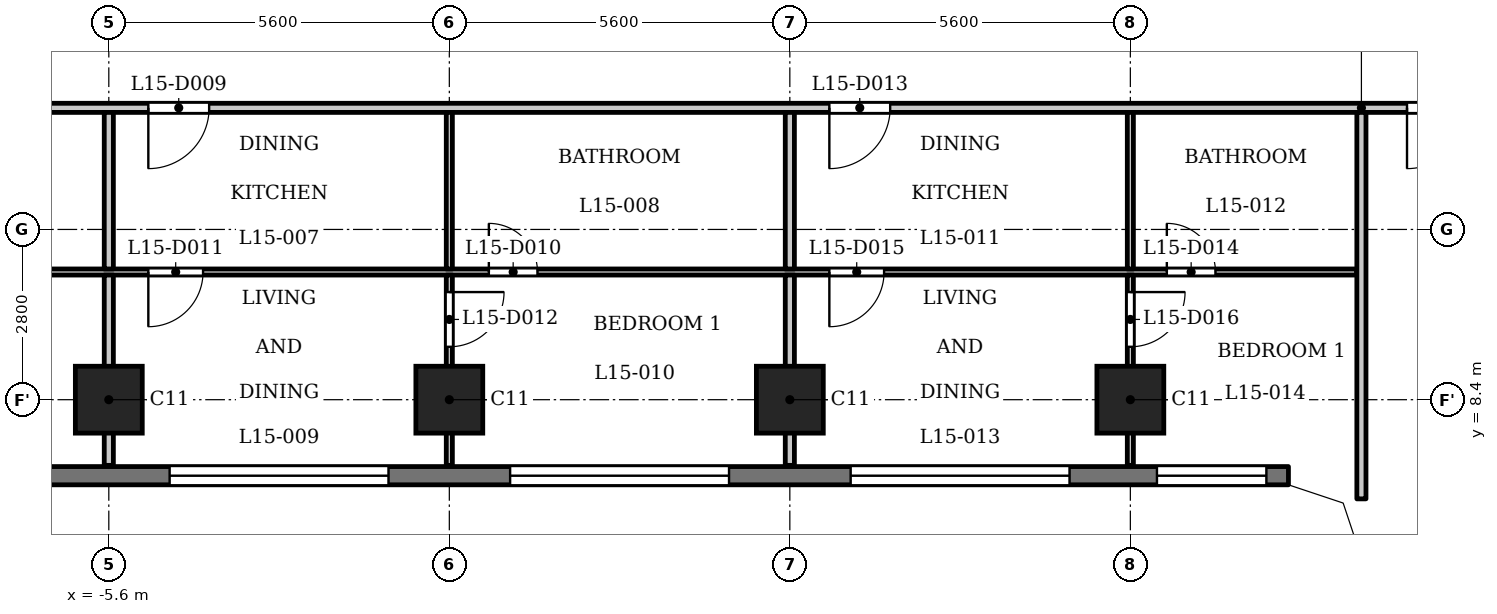
"""IFC4 building model, lengths in metres.
Left out: names, types, materials, properties, quantities, classifications, styles, units other than length and angle.
Written with IfcOpenShell. Run it as: python <this file> out.ifc"""

import sys

from ifc_helpers import new_model, si_unit, direction, frame, frame_2d, origin, origin_2d, place, context, subcontext, project, spatial, polyline, rectangle, outline, extrude, element, fill, save


model = new_model("IFC4")
c1 = context("Model", 3, precision=1e-05, world=origin(), true_north=direction((0.0, 1.0)))
c2 = subcontext(c1, "Body", "Model", "MODEL_VIEW")
j1 = project(units=[si_unit("LENGTHUNIT", "METRE"), si_unit("PLANEANGLEUNIT", "RADIAN")], contexts=[c1])
p1 = place(None, origin())
s1 = spatial("IfcSite", under=j1, at=p1, CompositionType="ELEMENT")
p2 = place(p1, origin())
s2 = spatial("IfcBuilding", under=s1, at=p2, CompositionType="ELEMENT")
p3 = place(p2, frame((0.0, 0.0, 62.0)))
s3 = spatial("IfcBuildingStorey", under=s2, at=p3, CompositionType="ELEMENT", Elevation=62.0)
for number, where, z_axis, x_axis in (
    (1, (-5.6, 8.4, 0.0), (0.0, 0.0, 1.0), (1.0, 0.0, 0.0)),
    (2, (0.0, 8.4, 0.0), (0.0, 0.0, 1.0), (1.0, 0.0, 0.0)),
    (3, (5.6, 8.4, 0.0), (0.0, 0.0, 1.0), (1.0, 0.0, 0.0)),
    (4, (11.2, 8.4, 0.0), (0.0, 0.0, 1.0), (1.0, 0.0, 0.0)),
):
    element("IfcColumn", number, at=place(p3, frame(where, z_axis=z_axis, x_axis=x_axis)), inside=s3, PredefinedType="COLUMN", context=c2, shape_type="SweptSolid", body=[
        extrude(rectangle(XDim=1.1, YDim=1.1, at=origin_2d()), origin(), (0.0, 0.0, 1.0), 3.5),
    ])
p4 = place(p3, frame((-13.8, 7.15, 0.0), z_axis=(0.0, 0.0, 1.0), x_axis=(1.0, 0.0, 0.0)))
e5 = element("IfcWall", 5, at=p4, inside=s3, PredefinedType="SOLIDWALL", context=c2, shape_type="SweptSolid", body=[
    extrude(rectangle(XDim=27.6, YDim=0.3, at=frame_2d((13.8, 0.0))), origin(), (0.0, 0.0, 1.0), 3.2),
])
p5 = place(p4, frame((0.363, 0.0, 0.9)))
e6 = element("IfcOpeningElement", 6, at=p5, cuts=e5, PredefinedType="OPENING", context=c2, shape_type="SweptSolid", body=[
    extrude(rectangle(XDim=1.8, YDim=1.25, at=frame_2d((0.9, 0.625))), frame((0.0, 0.16, 0.0), z_axis=(0.0, -1.0, 0.0), x_axis=(1.0, 0.0, 0.0)), (0.0, 0.0, 1.0), 0.32),
])
p6 = place(p4, frame((3.6, 0.0, 1.2)))
e7 = element("IfcOpeningElement", 7, at=p6, cuts=e5, PredefinedType="OPENING", context=c2, shape_type="SweptSolid", body=[
    extrude(rectangle(XDim=3.6, YDim=0.95, at=frame_2d((1.8, 0.475))), frame((0.0, 0.16, 0.0), z_axis=(0.0, -1.0, 0.0), x_axis=(1.0, 0.0, 0.0)), (0.0, 0.0, 1.0), 0.32),
])
p7 = place(p4, frame((9.2, 0.0, 1.2)))
e8 = element("IfcOpeningElement", 8, at=p7, cuts=e5, PredefinedType="OPENING", context=c2, shape_type="SweptSolid", body=[
    extrude(rectangle(XDim=3.6, YDim=0.95, at=frame_2d((1.8, 0.475))), frame((0.0, 0.16, 0.0), z_axis=(0.0, -1.0, 0.0), x_axis=(1.0, 0.0, 0.0)), (0.0, 0.0, 1.0), 0.32),
])
p8 = place(p4, frame((14.8, 0.0, 1.2)))
e9 = element("IfcOpeningElement", 9, at=p8, cuts=e5, PredefinedType="OPENING", context=c2, shape_type="SweptSolid", body=[
    extrude(rectangle(XDim=3.6, YDim=0.95, at=frame_2d((1.8, 0.475))), frame((0.0, 0.16, 0.0), z_axis=(0.0, -1.0, 0.0), x_axis=(1.0, 0.0, 0.0)), (0.0, 0.0, 1.0), 0.32),
])
p9 = place(p4, frame((20.4, 0.0, 1.2)))
e10 = element("IfcOpeningElement", 10, at=p9, cuts=e5, PredefinedType="OPENING", context=c2, shape_type="SweptSolid", body=[
    extrude(rectangle(XDim=3.6, YDim=0.95, at=frame_2d((1.8, 0.475))), frame((0.0, 0.16, 0.0), z_axis=(0.0, -1.0, 0.0), x_axis=(1.0, 0.0, 0.0)), (0.0, 0.0, 1.0), 0.32),
])
p10 = place(p4, frame((25.438, 0.0, 0.9)))
e11 = element("IfcOpeningElement", 11, at=p10, cuts=e5, PredefinedType="OPENING", context=c2, shape_type="SweptSolid", body=[
    extrude(rectangle(XDim=1.8, YDim=1.25, at=frame_2d((0.9, 0.625))), frame((0.0, 0.16, 0.0), z_axis=(0.0, -1.0, 0.0), x_axis=(1.0, 0.0, 0.0)), (0.0, 0.0, 1.0), 0.32),
])
p11 = place(p3, frame((-14.925, 10.5, 0.0), z_axis=(0.0, 0.0, 1.0), x_axis=(1.0, 0.0, 0.0)))
e12 = element("IfcWall", 12, at=p11, inside=s3, PredefinedType="PARTITIONING", context=c2, shape_type="SweptSolid", body=[
    extrude(rectangle(XDim=29.85, YDim=0.1, at=frame_2d((14.925, 0.0))), origin(), (0.0, 0.0, 1.0), 3.2),
])
p12 = place(p11, frame((0.525, 0.0, 0.0)))
e13 = element("IfcOpeningElement", 13, at=p12, cuts=e12, PredefinedType="OPENING", context=c2, shape_type="SweptSolid", body=[
    extrude(rectangle(XDim=0.8, YDim=2.1, at=frame_2d((0.4, 1.05))), frame((0.0, 0.06, 0.0), z_axis=(0.0, -1.0, 0.0), x_axis=(1.0, 0.0, 0.0)), (0.0, 0.0, 1.0), 0.12),
])
p13 = place(p11, frame((4.375, 0.0, 0.0)))
e14 = element("IfcOpeningElement", 14, at=p13, cuts=e12, PredefinedType="OPENING", context=c2, shape_type="SweptSolid", body=[
    extrude(rectangle(XDim=0.9, YDim=2.1, at=frame_2d((0.45, 1.05))), frame((0.0, 0.06, 0.0), z_axis=(0.0, -1.0, 0.0), x_axis=(1.0, 0.0, 0.0)), (0.0, 0.0, 1.0), 0.12),
])
p14 = place(p11, frame((15.575, 0.0, 0.0)))
e15 = element("IfcOpeningElement", 15, at=p14, cuts=e12, PredefinedType="OPENING", context=c2, shape_type="SweptSolid", body=[
    extrude(rectangle(XDim=0.8, YDim=2.1, at=frame_2d((0.4, 1.05))), frame((0.0, 0.06, 0.0), z_axis=(0.0, -1.0, 0.0), x_axis=(1.0, 0.0, 0.0)), (0.0, 0.0, 1.0), 0.12),
])
p15 = place(p11, frame((9.975, 0.0, 0.0)))
e16 = element("IfcOpeningElement", 16, at=p15, cuts=e12, PredefinedType="OPENING", context=c2, shape_type="SweptSolid", body=[
    extrude(rectangle(XDim=0.9, YDim=2.1, at=frame_2d((0.45, 1.05))), frame((0.0, 0.06, 0.0), z_axis=(0.0, -1.0, 0.0), x_axis=(1.0, 0.0, 0.0)), (0.0, 0.0, 1.0), 0.12),
])
p16 = place(p11, frame((26.725, 0.0, 0.0)))
e17 = element("IfcOpeningElement", 17, at=p16, cuts=e12, PredefinedType="OPENING", context=c2, shape_type="SweptSolid", body=[
    extrude(rectangle(XDim=0.8, YDim=2.1, at=frame_2d((0.4, 1.05))), frame((0.0, 0.06, 0.0), z_axis=(0.0, -1.0, 0.0), x_axis=(1.0, 0.0, 0.0)), (0.0, 0.0, 1.0), 0.12),
])
p17 = place(p11, frame((21.175, 0.0, 0.0)))
e18 = element("IfcOpeningElement", 18, at=p17, cuts=e12, PredefinedType="OPENING", context=c2, shape_type="SweptSolid", body=[
    extrude(rectangle(XDim=0.9, YDim=2.1, at=frame_2d((0.45, 1.05))), frame((0.0, 0.06, 0.0), z_axis=(0.0, -1.0, 0.0), x_axis=(1.0, 0.0, 0.0)), (0.0, 0.0, 1.0), 0.12),
])
p18 = place(p3, frame((-17.4, 13.2, 0.0), z_axis=(0.0, 0.0, 1.0), x_axis=(1.0, 0.0, 0.0)))
e19 = element("IfcWall", 19, at=p18, inside=s3, PredefinedType="PARTITIONING", context=c2, shape_type="SweptSolid", body=[
    extrude(rectangle(XDim=34.8, YDim=0.15, at=frame_2d((17.4, 0.0))), origin(), (0.0, 0.0, 1.0), 3.2),
])
p19 = place(p18, frame((0.75, 0.0, 0.0)))
e20 = element("IfcOpeningElement", 20, at=p19, cuts=e19, PredefinedType="OPENING", context=c2, shape_type="SweptSolid", body=[
    extrude(rectangle(XDim=1.0, YDim=2.1, at=frame_2d((0.5, 1.05))), frame((0.0, 0.085, 0.0), z_axis=(0.0, -1.0, 0.0), x_axis=(1.0, 0.0, 0.0)), (0.0, 0.0, 1.0), 0.17),
])
p20 = place(p18, frame((33.15, 0.0, 0.0)))
e21 = element("IfcOpeningElement", 21, at=p20, cuts=e19, PredefinedType="OPENING", context=c2, shape_type="SweptSolid", body=[
    extrude(rectangle(XDim=1.0, YDim=2.1, at=frame_2d((0.5, 1.05))), frame((0.0, 0.085, 0.0), z_axis=(0.0, -1.0, 0.0), x_axis=(1.0, 0.0, 0.0)), (0.0, 0.0, 1.0), 0.17),
])
p21 = place(p18, frame((6.85, 0.0, 0.0)))
e22 = element("IfcOpeningElement", 22, at=p21, cuts=e19, PredefinedType="OPENING", context=c2, shape_type="SweptSolid", body=[
    extrude(rectangle(XDim=1.0, YDim=2.1, at=frame_2d((0.5, 1.05))), frame((0.0, 0.085, 0.0), z_axis=(0.0, -1.0, 0.0), x_axis=(1.0, 0.0, 0.0)), (0.0, 0.0, 1.0), 0.17),
])
p22 = place(p18, frame((12.45, 0.0, 0.0)))
e23 = element("IfcOpeningElement", 23, at=p22, cuts=e19, PredefinedType="OPENING", context=c2, shape_type="SweptSolid", body=[
    extrude(rectangle(XDim=1.0, YDim=2.1, at=frame_2d((0.5, 1.05))), frame((0.0, 0.085, 0.0), z_axis=(0.0, -1.0, 0.0), x_axis=(1.0, 0.0, 0.0)), (0.0, 0.0, 1.0), 0.17),
])
p23 = place(p18, frame((23.65, 0.0, 0.0)))
e24 = element("IfcOpeningElement", 24, at=p23, cuts=e19, PredefinedType="OPENING", context=c2, shape_type="SweptSolid", body=[
    extrude(rectangle(XDim=1.0, YDim=2.1, at=frame_2d((0.5, 1.05))), frame((0.0, 0.085, 0.0), z_axis=(0.0, -1.0, 0.0), x_axis=(1.0, 0.0, 0.0)), (0.0, 0.0, 1.0), 0.17),
])
p24 = place(p3, frame((-5.6, 7.32, 0.0), z_axis=(0.0, 0.0, 1.0), x_axis=(0.0, 1.0, 0.0)))
e25 = element("IfcWall", 25, at=p24, inside=s3, PredefinedType="PARTITIONING", context=c2, shape_type="SweptSolid", body=[
    extrude(rectangle(XDim=3.13, YDim=0.15, at=frame_2d((1.565, 0.0))), origin(), (0.0, 0.0, 1.0), 3.2),
])
p25 = place(p3, frame((-5.6, 10.55, 0.0), z_axis=(0.0, 0.0, 1.0), x_axis=(0.0, 1.0, 0.0)))
e26 = element("IfcWall", 26, at=p25, inside=s3, PredefinedType="PARTITIONING", context=c2, shape_type="SweptSolid", body=[
    extrude(rectangle(XDim=2.575, YDim=0.15, at=frame_2d((1.288, 0.0))), origin(), (0.0, 0.0, 1.0), 3.2),
])
p26 = place(p3, frame((0.0, 7.32, 0.0), z_axis=(0.0, 0.0, 1.0), x_axis=(0.0, 1.0, 0.0)))
e27 = element("IfcWall", 27, at=p26, inside=s3, PredefinedType="PARTITIONING", context=c2, shape_type="SweptSolid", body=[
    extrude(rectangle(XDim=3.13, YDim=0.1, at=frame_2d((1.565, 0.0))), origin(), (0.0, 0.0, 1.0), 3.2),
])
p27 = place(p26, frame((1.95, 0.0, 0.0)))
e28 = element("IfcOpeningElement", 28, at=p27, cuts=e27, PredefinedType="OPENING", context=c2, shape_type="SweptSolid", body=[
    extrude(rectangle(XDim=0.9, YDim=2.1, at=frame_2d((0.45, 1.05))), frame((0.0, 0.06, 0.0), z_axis=(0.0, -1.0, 0.0), x_axis=(1.0, 0.0, 0.0)), (0.0, 0.0, 1.0), 0.12),
])
p28 = place(p3, frame((0.0, 10.55, 0.0), z_axis=(0.0, 0.0, 1.0), x_axis=(0.0, 1.0, 0.0)))
e29 = element("IfcWall", 29, at=p28, inside=s3, PredefinedType="PARTITIONING", context=c2, shape_type="SweptSolid", body=[
    extrude(rectangle(XDim=2.575, YDim=0.1, at=frame_2d((1.288, 0.0))), origin(), (0.0, 0.0, 1.0), 3.2),
])
p29 = place(p3, frame((5.6, 7.32, 0.0), z_axis=(0.0, 0.0, 1.0), x_axis=(0.0, 1.0, 0.0)))
e30 = element("IfcWall", 30, at=p29, inside=s3, PredefinedType="PARTITIONING", context=c2, shape_type="SweptSolid", body=[
    extrude(rectangle(XDim=3.13, YDim=0.15, at=frame_2d((1.565, 0.0))), origin(), (0.0, 0.0, 1.0), 3.2),
])
p30 = place(p3, frame((5.6, 10.55, 0.0), z_axis=(0.0, 0.0, 1.0), x_axis=(0.0, 1.0, 0.0)))
e31 = element("IfcWall", 31, at=p30, inside=s3, PredefinedType="PARTITIONING", context=c2, shape_type="SweptSolid", body=[
    extrude(rectangle(XDim=2.575, YDim=0.15, at=frame_2d((1.288, 0.0))), origin(), (0.0, 0.0, 1.0), 3.2),
])
p31 = place(p3, frame((11.2, 7.32, 0.0), z_axis=(0.0, 0.0, 1.0), x_axis=(0.0, 1.0, 0.0)))
e32 = element("IfcWall", 32, at=p31, inside=s3, PredefinedType="PARTITIONING", context=c2, shape_type="SweptSolid", body=[
    extrude(rectangle(XDim=3.13, YDim=0.1, at=frame_2d((1.565, 0.0))), origin(), (0.0, 0.0, 1.0), 3.2),
])
p32 = place(p31, frame((1.95, 0.0, 0.0)))
e33 = element("IfcOpeningElement", 33, at=p32, cuts=e32, PredefinedType="OPENING", context=c2, shape_type="SweptSolid", body=[
    extrude(rectangle(XDim=0.9, YDim=2.1, at=frame_2d((0.45, 1.05))), frame((0.0, 0.06, 0.0), z_axis=(0.0, -1.0, 0.0), x_axis=(1.0, 0.0, 0.0)), (0.0, 0.0, 1.0), 0.12),
])
p33 = place(p3, frame((11.2, 10.55, 0.0), z_axis=(0.0, 0.0, 1.0), x_axis=(0.0, 1.0, 0.0)))
e34 = element("IfcWall", 34, at=p33, inside=s3, PredefinedType="PARTITIONING", context=c2, shape_type="SweptSolid", body=[
    extrude(rectangle(XDim=2.575, YDim=0.1, at=frame_2d((1.288, 0.0))), origin(), (0.0, 0.0, 1.0), 3.2),
])
p34 = place(p3, frame((15.0, 6.769, 0.0), z_axis=(0.0, 0.0, 1.0), x_axis=(0.0, 1.0, 0.0)))
e35 = element("IfcWall", 35, at=p34, inside=s3, PredefinedType="PARTITIONING", context=c2, shape_type="SweptSolid", body=[
    extrude(rectangle(XDim=6.356, YDim=0.15, at=frame_2d((3.178, 0.0))), origin(), (0.0, 0.0, 1.0), 3.2),
])
p35 = place(p3, origin())
e36 = element("IfcWall", 36, at=p35, inside=s3, PredefinedType="SOLIDWALL", context=c2, shape_type="SweptSolid", body=[
    extrude(outline(polyline([(14.937, 6.937), (13.849, 7.3), (13.8, 7.3), (13.8, 7.0), (14.7, 6.7), (15.0, 5.8), (15.3, 5.8), (15.3, 5.849), (14.937, 6.937)])), origin(), (0.0, 0.0, 1.0), 3.2),
])
p36 = place(p20, origin())
e37 = element("IfcDoor", 37, at=p36, inside=s3, OperationType="SINGLE_SWING_LEFT", PredefinedType="DOOR", context=c2, shape_type="SweptSolid", body=[
    extrude(rectangle(XDim=1.0, YDim=2.1, at=frame_2d((0.5, 1.05))), frame((0.0, 0.025, 0.0), z_axis=(0.0, -1.0, 0.0), x_axis=(1.0, 0.0, 0.0)), (0.0, 0.0, 1.0), 0.05),
])
fill(e21, e37)
p37 = place(p22, origin())
e38 = element("IfcDoor", 38, at=p37, inside=s3, OperationType="SINGLE_SWING_LEFT", PredefinedType="DOOR", context=c2, shape_type="SweptSolid", body=[
    extrude(rectangle(XDim=1.0, YDim=2.1, at=frame_2d((0.5, 1.05))), frame((0.0, 0.025, 0.0), z_axis=(0.0, -1.0, 0.0), x_axis=(1.0, 0.0, 0.0)), (0.0, 0.0, 1.0), 0.05),
])
fill(e23, e38)
p38 = place(p14, origin())
e39 = element("IfcDoor", 39, at=p38, inside=s3, OperationType="SINGLE_SWING_RIGHT", PredefinedType="DOOR", context=c2, shape_type="SweptSolid", body=[
    extrude(rectangle(XDim=0.8, YDim=2.1, at=frame_2d((0.4, 1.05))), frame((0.0, 0.025, 0.0), z_axis=(0.0, -1.0, 0.0), x_axis=(1.0, 0.0, 0.0)), (0.0, 0.0, 1.0), 0.05),
])
fill(e15, e39)
p39 = place(p15, origin())
e40 = element("IfcDoor", 40, at=p39, inside=s3, OperationType="SINGLE_SWING_LEFT", PredefinedType="DOOR", context=c2, shape_type="SweptSolid", body=[
    extrude(rectangle(XDim=0.9, YDim=2.1, at=frame_2d((0.45, 1.05))), frame((0.0, 0.025, 0.0), z_axis=(0.0, -1.0, 0.0), x_axis=(1.0, 0.0, 0.0)), (0.0, 0.0, 1.0), 0.05),
])
fill(e16, e40)
p40 = place(p27, origin())
e41 = element("IfcDoor", 41, at=p40, inside=s3, OperationType="SINGLE_SWING_RIGHT", PredefinedType="DOOR", context=c2, shape_type="SweptSolid", body=[
    extrude(rectangle(XDim=0.9, YDim=2.1, at=frame_2d((0.45, 1.05))), frame((0.0, 0.025, 0.0), z_axis=(0.0, -1.0, 0.0), x_axis=(1.0, 0.0, 0.0)), (0.0, 0.0, 1.0), 0.05),
])
fill(e28, e41)
p41 = place(p23, origin())
e42 = element("IfcDoor", 42, at=p41, inside=s3, OperationType="SINGLE_SWING_LEFT", PredefinedType="DOOR", context=c2, shape_type="SweptSolid", body=[
    extrude(rectangle(XDim=1.0, YDim=2.1, at=frame_2d((0.5, 1.05))), frame((0.0, 0.025, 0.0), z_axis=(0.0, -1.0, 0.0), x_axis=(1.0, 0.0, 0.0)), (0.0, 0.0, 1.0), 0.05),
])
fill(e24, e42)
p42 = place(p16, origin())
e43 = element("IfcDoor", 43, at=p42, inside=s3, OperationType="SINGLE_SWING_RIGHT", PredefinedType="DOOR", context=c2, shape_type="SweptSolid", body=[
    extrude(rectangle(XDim=0.8, YDim=2.1, at=frame_2d((0.4, 1.05))), frame((0.0, 0.025, 0.0), z_axis=(0.0, -1.0, 0.0), x_axis=(1.0, 0.0, 0.0)), (0.0, 0.0, 1.0), 0.05),
])
fill(e17, e43)
p43 = place(p17, origin())
e44 = element("IfcDoor", 44, at=p43, inside=s3, OperationType="SINGLE_SWING_LEFT", PredefinedType="DOOR", context=c2, shape_type="SweptSolid", body=[
    extrude(rectangle(XDim=0.9, YDim=2.1, at=frame_2d((0.45, 1.05))), frame((0.0, 0.025, 0.0), z_axis=(0.0, -1.0, 0.0), x_axis=(1.0, 0.0, 0.0)), (0.0, 0.0, 1.0), 0.05),
])
fill(e18, e44)
p44 = place(p32, origin())
e45 = element("IfcDoor", 45, at=p44, inside=s3, OperationType="SINGLE_SWING_RIGHT", PredefinedType="DOOR", context=c2, shape_type="SweptSolid", body=[
    extrude(rectangle(XDim=0.9, YDim=2.1, at=frame_2d((0.45, 1.05))), frame((0.0, 0.025, 0.0), z_axis=(0.0, -1.0, 0.0), x_axis=(1.0, 0.0, 0.0)), (0.0, 0.0, 1.0), 0.05),
])
fill(e33, e45)
p45 = place(p7, origin())
e46 = element("IfcWindow", 46, at=p45, inside=s3, PartitioningType="SINGLE_PANEL", PredefinedType="WINDOW", context=c2, shape_type="SweptSolid", body=[
    extrude(rectangle(XDim=3.6, YDim=0.95, at=frame_2d((1.8, 0.475))), frame((0.0, 0.03, 0.0), z_axis=(0.0, -1.0, 0.0), x_axis=(1.0, 0.0, 0.0)), (0.0, 0.0, 1.0), 0.06),
])
fill(e8, e46)
p46 = place(p8, origin())
e47 = element("IfcWindow", 47, at=p46, inside=s3, PartitioningType="SINGLE_PANEL", PredefinedType="WINDOW", context=c2, shape_type="SweptSolid", body=[
    extrude(rectangle(XDim=3.6, YDim=0.95, at=frame_2d((1.8, 0.475))), frame((0.0, 0.03, 0.0), z_axis=(0.0, -1.0, 0.0), x_axis=(1.0, 0.0, 0.0)), (0.0, 0.0, 1.0), 0.06),
])
fill(e9, e47)
p47 = place(p9, origin())
e48 = element("IfcWindow", 48, at=p47, inside=s3, PartitioningType="SINGLE_PANEL", PredefinedType="WINDOW", context=c2, shape_type="SweptSolid", body=[
    extrude(rectangle(XDim=3.6, YDim=0.95, at=frame_2d((1.8, 0.475))), frame((0.0, 0.03, 0.0), z_axis=(0.0, -1.0, 0.0), x_axis=(1.0, 0.0, 0.0)), (0.0, 0.0, 1.0), 0.06),
])
fill(e10, e48)
p48 = place(p10, origin())
e49 = element("IfcWindow", 49, at=p48, inside=s3, PartitioningType="SINGLE_PANEL", PredefinedType="WINDOW", context=c2, shape_type="SweptSolid", body=[
    extrude(rectangle(XDim=1.8, YDim=1.25, at=frame_2d((0.9, 0.625))), frame((0.0, 0.03, 0.0), z_axis=(0.0, -1.0, 0.0), x_axis=(1.0, 0.0, 0.0)), (0.0, 0.0, 1.0), 0.06),
])
fill(e11, e49)
save(model, sys.argv[1])
